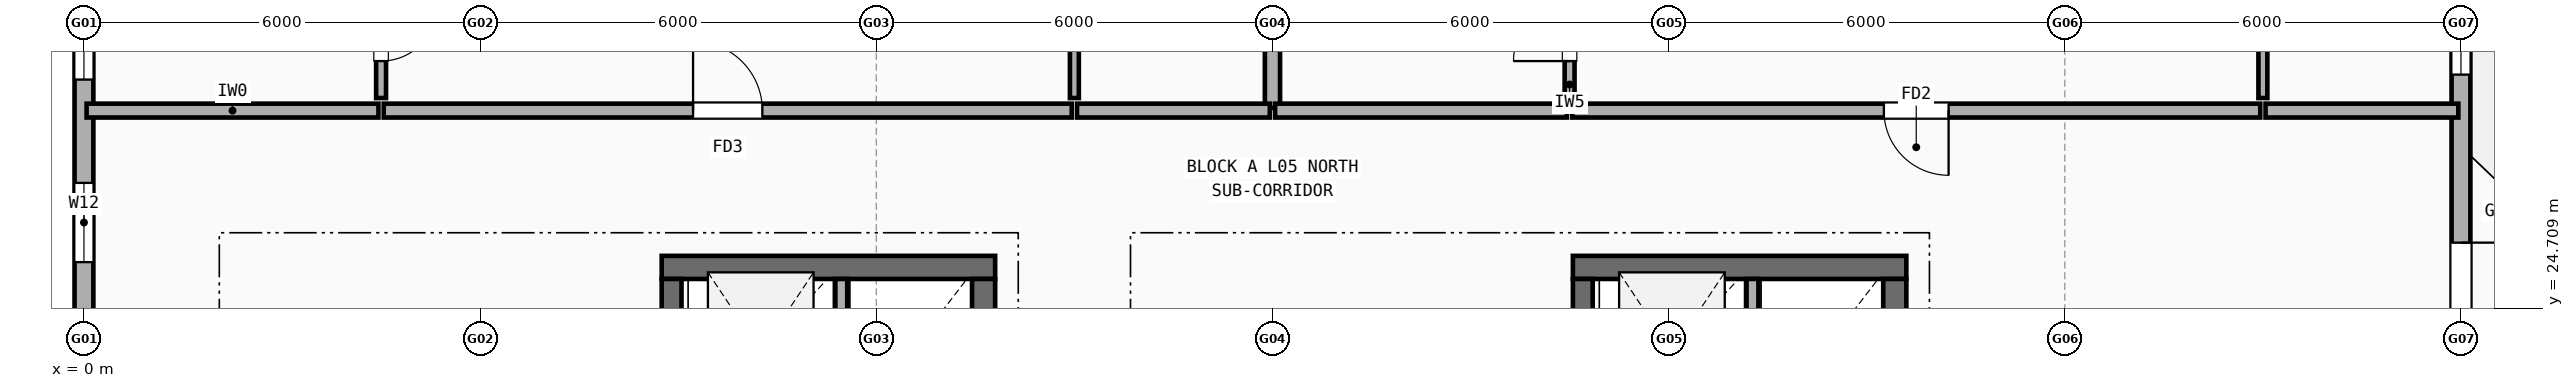
"""IFC4 building model, lengths in metres.
Left out: names, types, materials, properties, quantities, classifications, styles, units other than length and angle.
Written with IfcOpenShell. Run it as: python <this file> out.ifc"""

import sys

from ifc_helpers import new_model, si_unit, direction, frame, frame_2d, origin, place, context, subcontext, project, spatial, rectangle, extrude, element, fill, save


model = new_model("IFC4")
c1 = context("Model", 3, precision=1e-05, world=origin(), true_north=direction((0.0, 1.0)))
c2 = subcontext(c1, "Body", "Model", "MODEL_VIEW")
j1 = project(units=[si_unit("LENGTHUNIT", "METRE"), si_unit("PLANEANGLEUNIT", "RADIAN")], contexts=[c1])
p1 = place(None, origin())
s1 = spatial("IfcSite", under=j1, at=p1, CompositionType="ELEMENT")
p2 = place(p1, origin())
s2 = spatial("IfcBuilding", under=s1, at=p2, CompositionType="ELEMENT")
p3 = place(p2, frame((0.0, 0.0, 17.3)))
s3 = spatial("IfcBuildingStorey", under=s2, at=p3, CompositionType="ELEMENT", Elevation=17.3)
p4 = place(p3, frame((36.0, 24.35, 0.0), z_axis=(0.0, 0.0, 1.0), x_axis=(0.0, 1.0, 0.0)))
e1 = element("IfcWall", 1, at=p4, inside=s3, PredefinedType="STANDARD", context=c2, shape_type="SweptSolid", body=[
    extrude(rectangle(XDim=5.3, YDim=0.285, at=frame_2d((2.65, 0.0))), origin(), (0.0, 0.0, 1.0), 2.447),
])
p5 = place(p4, frame((0.2, 0.0, 0.0)))
e2 = element("IfcOpeningElement", 2, at=p5, cuts=e1, PredefinedType="OPENING", context=c2, shape_type="SweptSolid", body=[
    extrude(rectangle(XDim=1.15, YDim=2.15, at=frame_2d((0.575, 1.075))), frame((0.0, 0.152, 0.0), z_axis=(0.0, -1.0, 0.0), x_axis=(1.0, 0.0, 0.0)), (0.0, 0.0, 1.0), 0.305),
])
p6 = place(p4, frame((3.895, 0.0, 0.9)))
e3 = element("IfcOpeningElement", 3, at=p6, cuts=e1, PredefinedType="OPENING", context=c2, shape_type="SweptSolid", body=[
    extrude(rectangle(XDim=0.9, YDim=1.3, at=frame_2d((0.45, 0.65))), frame((0.0, 0.152, 0.0), z_axis=(0.0, -1.0, 0.0), x_axis=(1.0, 0.0, 0.0)), (0.0, 0.0, 1.0), 0.305),
])
p7 = place(p3, frame((0.0, 29.65, 0.0), z_axis=(0.0, 0.0, 1.0), x_axis=(0.0, -1.0, 0.0)))
e4 = element("IfcWall", 4, at=p7, inside=s3, PredefinedType="STANDARD", context=c2, shape_type="SweptSolid", body=[
    extrude(rectangle(XDim=5.3, YDim=0.285, at=frame_2d((2.65, 0.0))), origin(), (0.0, 0.0, 1.0), 2.447),
])
p8 = place(p7, frame((0.43, 0.0, 0.9)))
e5 = element("IfcOpeningElement", 5, at=p8, cuts=e4, PredefinedType="OPENING", context=c2, shape_type="SweptSolid", body=[
    extrude(rectangle(XDim=1.05, YDim=1.35, at=frame_2d((0.525, 0.675))), frame((0.0, 0.152, 0.0), z_axis=(0.0, -1.0, 0.0), x_axis=(1.0, 0.0, 0.0)), (0.0, 0.0, 1.0), 0.305),
])
p9 = place(p7, frame((3.045, 0.0, 0.9)))
e6 = element("IfcOpeningElement", 6, at=p9, cuts=e4, PredefinedType="OPENING", context=c2, shape_type="SweptSolid", body=[
    extrude(rectangle(XDim=1.2, YDim=1.35, at=frame_2d((0.6, 0.675))), frame((0.0, 0.152, 0.0), z_axis=(0.0, -1.0, 0.0), x_axis=(1.0, 0.0, 0.0)), (0.0, 0.0, 1.0), 0.305),
])
p10 = place(p3, frame((13.8, 25.325, 0.0), z_axis=(0.0, 0.0, 1.0), x_axis=(-1.0, 0.0, 0.0)))
e7 = element("IfcWall", 7, at=p10, inside=s3, PredefinedType="SHEAR", context=c2, shape_type="SweptSolid", body=[
    extrude(rectangle(XDim=5.05, YDim=0.35, at=frame_2d((2.525, 0.0))), origin(), (0.0, 0.0, 1.0), 2.965),
])
p11 = place(p3, frame((13.625, 18.75, 0.0), z_axis=(0.0, 0.0, 1.0), x_axis=(0.0, 1.0, 0.0)))
e8 = element("IfcWall", 8, at=p11, inside=s3, PredefinedType="SHEAR", context=c2, shape_type="SweptSolid", body=[
    extrude(rectangle(XDim=6.4, YDim=0.35, at=frame_2d((3.2, 0.0))), origin(), (0.0, 0.0, 1.0), 2.965),
])
p12 = place(p3, frame((8.9, 21.8, 0.0), z_axis=(0.0, 0.0, 1.0), x_axis=(0.0, 1.0, 0.0)))
e9 = element("IfcWall", 9, at=p12, inside=s3, PredefinedType="SHEAR", context=c2, shape_type="SweptSolid", body=[
    extrude(rectangle(XDim=3.35, YDim=0.3, at=frame_2d((1.675, 0.0))), origin(), (0.0, 0.0, 1.0), 2.965),
])
p13 = place(p3, frame((11.47, 22.94, 0.0), z_axis=(0.0, 0.0, 1.0), x_axis=(0.0, 1.0, 0.0)))
e10 = element("IfcWall", 10, at=p13, inside=s3, PredefinedType="SOLIDWALL", context=c2, shape_type="SweptSolid", body=[
    extrude(rectangle(XDim=2.21, YDim=0.18, at=frame_2d((1.105, 0.0))), origin(), (0.0, 0.0, 1.0), 2.965),
])
p14 = place(p3, frame((27.6, 25.325, 0.0), z_axis=(0.0, 0.0, 1.0), x_axis=(-1.0, 0.0, 0.0)))
e11 = element("IfcWall", 11, at=p14, inside=s3, PredefinedType="SHEAR", context=c2, shape_type="SweptSolid", body=[
    extrude(rectangle(XDim=5.05, YDim=0.35, at=frame_2d((2.525, 0.0))), origin(), (0.0, 0.0, 1.0), 2.965),
])
p15 = place(p3, frame((27.425, 18.75, 0.0), z_axis=(0.0, 0.0, 1.0), x_axis=(0.0, 1.0, 0.0)))
e12 = element("IfcWall", 12, at=p15, inside=s3, PredefinedType="SHEAR", context=c2, shape_type="SweptSolid", body=[
    extrude(rectangle(XDim=6.4, YDim=0.35, at=frame_2d((3.2, 0.0))), origin(), (0.0, 0.0, 1.0), 2.965),
])
p16 = place(p3, frame((22.7, 21.8, 0.0), z_axis=(0.0, 0.0, 1.0), x_axis=(0.0, 1.0, 0.0)))
e13 = element("IfcWall", 13, at=p16, inside=s3, PredefinedType="SHEAR", context=c2, shape_type="SweptSolid", body=[
    extrude(rectangle(XDim=3.35, YDim=0.3, at=frame_2d((1.675, 0.0))), origin(), (0.0, 0.0, 1.0), 2.965),
])
p17 = place(p3, frame((25.27, 22.94, 0.0), z_axis=(0.0, 0.0, 1.0), x_axis=(0.0, 1.0, 0.0)))
e14 = element("IfcWall", 14, at=p17, inside=s3, PredefinedType="SOLIDWALL", context=c2, shape_type="SweptSolid", body=[
    extrude(rectangle(XDim=2.21, YDim=0.18, at=frame_2d((1.105, 0.0))), origin(), (0.0, 0.0, 1.0), 2.965),
])
p18 = place(p3, frame((18.0, 27.74, 0.0), z_axis=(0.0, 0.0, 1.0), x_axis=(0.0, 1.0, 0.0)))
e15 = element("IfcWall", 15, at=p18, inside=s3, PredefinedType="SOLIDWALL", context=c2, shape_type="SweptSolid", body=[
    extrude(rectangle(XDim=13.87, YDim=0.23, at=frame_2d((6.935, 0.0))), origin(), (0.0, 0.0, 1.0), 2.458),
])
p19 = place(p3, frame((0.04, 27.7, 0.0), z_axis=(0.0, 0.0, 1.0), x_axis=(1.0, 0.0, 0.0)))
e16 = element("IfcWall", 16, at=p19, inside=s3, PredefinedType="SOLIDWALL", context=c2, shape_type="SweptSolid", body=[
    extrude(rectangle(XDim=4.42, YDim=0.21, at=frame_2d((2.21, 0.0))), origin(), (0.0, 0.0, 1.0), 2.447),
])
p20 = place(p3, frame((4.54, 27.7, 0.0), z_axis=(0.0, 0.0, 1.0), x_axis=(1.0, 0.0, 0.0)))
e17 = element("IfcWall", 17, at=p20, inside=s3, PredefinedType="SOLIDWALL", context=c2, shape_type="SweptSolid", body=[
    extrude(rectangle(XDim=10.42, YDim=0.21, at=frame_2d((5.21, 0.0))), origin(), (0.0, 0.0, 1.0), 2.508),
])
p21 = place(p20, frame((4.685, 0.0, 0.0)))
e18 = element("IfcOpeningElement", 18, at=p21, cuts=e17, PredefinedType="OPENING", context=c2, shape_type="SweptSolid", body=[
    extrude(rectangle(XDim=1.05, YDim=2.15, at=frame_2d((0.525, 1.075))), frame((0.0, 0.115, 0.0), z_axis=(0.0, -1.0, 0.0), x_axis=(1.0, 0.0, 0.0)), (0.0, 0.0, 1.0), 0.23),
])
p22 = place(p3, frame((4.5, 27.89, 0.0), z_axis=(0.0, 0.0, 1.0), x_axis=(0.0, 1.0, 0.0)))
e19 = element("IfcWall", 19, at=p22, inside=s3, PredefinedType="PARTITIONING", context=c2, shape_type="SweptSolid", body=[
    extrude(rectangle(XDim=1.97, YDim=0.15, at=frame_2d((0.985, 0.0))), origin(), (0.0, 0.0, 1.0), 2.965),
])
p23 = place(p22, frame((0.56, 0.0, 0.0)))
e20 = element("IfcOpeningElement", 20, at=p23, cuts=e19, PredefinedType="OPENING", context=c2, shape_type="SweptSolid", body=[
    extrude(rectangle(XDim=0.85, YDim=2.1, at=frame_2d((0.425, 1.05))), frame((0.0, 0.085, 0.0), z_axis=(0.0, -1.0, 0.0), x_axis=(1.0, 0.0, 0.0)), (0.0, 0.0, 1.0), 0.17),
])
p24 = place(p3, frame((15.04, 27.7, 0.0), z_axis=(0.0, 0.0, 1.0), x_axis=(1.0, 0.0, 0.0)))
e21 = element("IfcWall", 21, at=p24, inside=s3, PredefinedType="SOLIDWALL", context=c2, shape_type="SweptSolid", body=[
    extrude(rectangle(XDim=2.92, YDim=0.21, at=frame_2d((1.46, 0.0))), origin(), (0.0, 0.0, 1.0), 2.965),
])
p25 = place(p3, frame((15.0, 27.89, 0.0), z_axis=(0.0, 0.0, 1.0), x_axis=(0.0, 1.0, 0.0)))
e22 = element("IfcWall", 22, at=p25, inside=s3, PredefinedType="PARTITIONING", context=c2, shape_type="SweptSolid", body=[
    extrude(rectangle(XDim=13.92, YDim=0.135, at=frame_2d((6.96, 0.0))), origin(), (0.0, 0.0, 1.0), 2.447),
])
p26 = place(p25, frame((6.65, 0.0, 0.0)))
e23 = element("IfcOpeningElement", 23, at=p26, cuts=e22, PredefinedType="OPENING", context=c2, shape_type="SweptSolid", body=[
    extrude(rectangle(XDim=0.88, YDim=2.1, at=frame_2d((0.44, 1.05))), frame((0.0, 0.077, 0.0), z_axis=(0.0, -1.0, 0.0), x_axis=(1.0, 0.0, 0.0)), (0.0, 0.0, 1.0), 0.155),
])
p27 = place(p3, frame((18.04, 27.7, 0.0), z_axis=(0.0, 0.0, 1.0), x_axis=(1.0, 0.0, 0.0)))
e24 = element("IfcWall", 24, at=p27, inside=s3, PredefinedType="SOLIDWALL", context=c2, shape_type="SweptSolid", body=[
    extrude(rectangle(XDim=4.42, YDim=0.21, at=frame_2d((2.21, 0.0))), origin(), (0.0, 0.0, 1.0), 2.965),
])
p28 = place(p3, frame((22.54, 27.7, 0.0), z_axis=(0.0, 0.0, 1.0), x_axis=(1.0, 0.0, 0.0)))
e25 = element("IfcWall", 25, at=p28, inside=s3, PredefinedType="SOLIDWALL", context=c2, shape_type="SweptSolid", body=[
    extrude(rectangle(XDim=10.42, YDim=0.21, at=frame_2d((5.21, 0.0))), origin(), (0.0, 0.0, 1.0), 2.447),
])
p29 = place(p28, frame((4.72, 0.0, 0.0)))
e26 = element("IfcOpeningElement", 26, at=p29, cuts=e25, PredefinedType="OPENING", context=c2, shape_type="SweptSolid", body=[
    extrude(rectangle(XDim=0.98, YDim=2.15, at=frame_2d((0.49, 1.075))), frame((0.0, 0.115, 0.0), z_axis=(0.0, -1.0, 0.0), x_axis=(1.0, 0.0, 0.0)), (0.0, 0.0, 1.0), 0.23),
])
p30 = place(p3, frame((22.5, 27.89, 0.0), z_axis=(0.0, 0.0, 1.0), x_axis=(0.0, 1.0, 0.0)))
e27 = element("IfcWall", 27, at=p30, inside=s3, PredefinedType="PARTITIONING", context=c2, shape_type="SweptSolid", body=[
    extrude(rectangle(XDim=1.97, YDim=0.15, at=frame_2d((0.985, 0.0))), origin(), (0.0, 0.0, 1.0), 2.965),
])
p31 = place(p30, frame((0.56, 0.0, 0.0)))
e28 = element("IfcOpeningElement", 28, at=p31, cuts=e27, PredefinedType="OPENING", context=c2, shape_type="SweptSolid", body=[
    extrude(rectangle(XDim=0.85, YDim=2.1, at=frame_2d((0.425, 1.05))), frame((0.0, 0.085, 0.0), z_axis=(0.0, -1.0, 0.0), x_axis=(1.0, 0.0, 0.0)), (0.0, 0.0, 1.0), 0.17),
])
p32 = place(p3, frame((33.04, 27.7, 0.0), z_axis=(0.0, 0.0, 1.0), x_axis=(1.0, 0.0, 0.0)))
e29 = element("IfcWall", 29, at=p32, inside=s3, PredefinedType="SOLIDWALL", context=c2, shape_type="SweptSolid", body=[
    extrude(rectangle(XDim=2.92, YDim=0.21, at=frame_2d((1.46, 0.0))), origin(), (0.0, 0.0, 1.0), 2.447),
])
p33 = place(p3, frame((33.0, 27.89, 0.0), z_axis=(0.0, 0.0, 1.0), x_axis=(0.0, 1.0, 0.0)))
e30 = element("IfcWall", 30, at=p33, inside=s3, PredefinedType="PARTITIONING", context=c2, shape_type="SweptSolid", body=[
    extrude(rectangle(XDim=13.92, YDim=0.135, at=frame_2d((6.96, 0.0))), origin(), (0.0, 0.0, 1.0), 2.447),
])
p34 = place(p33, frame((6.65, 0.0, 0.0)))
e31 = element("IfcOpeningElement", 31, at=p34, cuts=e30, PredefinedType="OPENING", context=c2, shape_type="SweptSolid", body=[
    extrude(rectangle(XDim=0.9, YDim=2.1, at=frame_2d((0.45, 1.05))), frame((0.0, 0.077, 0.0), z_axis=(0.0, -1.0, 0.0), x_axis=(1.0, 0.0, 0.0)), (0.0, 0.0, 1.0), 0.155),
])
p35 = place(p5, frame((1.15, 0.0, 0.0), z_axis=(0.0, 0.0, 1.0), x_axis=(-1.0, 0.0, 0.0)))
e32 = element("IfcDoor", 32, at=p35, inside=s3, OperationType="SINGLE_SWING_RIGHT", PredefinedType="DOOR", context=c2, shape_type="SweptSolid", body=[
    extrude(rectangle(XDim=1.15, YDim=2.15, at=frame_2d((0.575, 1.075))), frame((0.0, 0.025, 0.0), z_axis=(0.0, -1.0, 0.0), x_axis=(1.0, 0.0, 0.0)), (0.0, 0.0, 1.0), 0.05),
])
fill(e2, e32)
p36 = place(p6, origin())
e33 = element("IfcWindow", 33, at=p36, inside=s3, PartitioningType="SINGLE_PANEL", PredefinedType="WINDOW", context=c2, shape_type="SweptSolid", body=[
    extrude(rectangle(XDim=0.9, YDim=1.3, at=frame_2d((0.45, 0.65))), frame((0.0, 0.03, 0.0), z_axis=(0.0, -1.0, 0.0), x_axis=(1.0, 0.0, 0.0)), (0.0, 0.0, 1.0), 0.06),
])
fill(e3, e33)
p37 = place(p8, origin())
e34 = element("IfcWindow", 34, at=p37, inside=s3, PartitioningType="SINGLE_PANEL", PredefinedType="WINDOW", context=c2, shape_type="SweptSolid", body=[
    extrude(rectangle(XDim=1.05, YDim=1.35, at=frame_2d((0.525, 0.675))), frame((0.0, 0.03, 0.0), z_axis=(0.0, -1.0, 0.0), x_axis=(1.0, 0.0, 0.0)), (0.0, 0.0, 1.0), 0.06),
])
fill(e5, e34)
p38 = place(p9, origin())
e35 = element("IfcWindow", 35, at=p38, inside=s3, PartitioningType="SINGLE_PANEL", PredefinedType="WINDOW", context=c2, shape_type="SweptSolid", body=[
    extrude(rectangle(XDim=1.2, YDim=1.35, at=frame_2d((0.6, 0.675))), frame((0.0, 0.03, 0.0), z_axis=(0.0, -1.0, 0.0), x_axis=(1.0, 0.0, 0.0)), (0.0, 0.0, 1.0), 0.06),
])
fill(e6, e35)
p39 = place(p21, origin())
e36 = element("IfcDoor", 36, at=p39, inside=s3, OperationType="SINGLE_SWING_LEFT", PredefinedType="DOOR", context=c2, shape_type="SweptSolid", body=[
    extrude(rectangle(XDim=1.05, YDim=2.15, at=frame_2d((0.525, 1.075))), frame((0.0, 0.025, 0.0), z_axis=(0.0, -1.0, 0.0), x_axis=(1.0, 0.0, 0.0)), (0.0, 0.0, 1.0), 0.05),
])
fill(e18, e36)
p40 = place(p23, origin())
e37 = element("IfcDoor", 37, at=p40, inside=s3, OperationType="SINGLE_SWING_RIGHT", PredefinedType="DOOR", context=c2, shape_type="SweptSolid", body=[
    extrude(rectangle(XDim=0.85, YDim=2.1, at=frame_2d((0.425, 1.05))), frame((0.0, 0.025, 0.0), z_axis=(0.0, -1.0, 0.0), x_axis=(1.0, 0.0, 0.0)), (0.0, 0.0, 1.0), 0.05),
])
fill(e20, e37)
p41 = place(p29, origin())
e38 = element("IfcDoor", 38, at=p41, inside=s3, OperationType="SINGLE_SWING_RIGHT", PredefinedType="DOOR", context=c2, shape_type="SweptSolid", body=[
    extrude(rectangle(XDim=0.98, YDim=2.15, at=frame_2d((0.49, 1.075))), frame((0.0, 0.025, 0.0), z_axis=(0.0, -1.0, 0.0), x_axis=(1.0, 0.0, 0.0)), (0.0, 0.0, 1.0), 0.05),
])
fill(e26, e38)
p42 = place(p31, origin())
e39 = element("IfcDoor", 39, at=p42, inside=s3, OperationType="SINGLE_SWING_LEFT", PredefinedType="DOOR", context=c2, shape_type="SweptSolid", body=[
    extrude(rectangle(XDim=0.85, YDim=2.1, at=frame_2d((0.425, 1.05))), frame((0.0, 0.025, 0.0), z_axis=(0.0, -1.0, 0.0), x_axis=(1.0, 0.0, 0.0)), (0.0, 0.0, 1.0), 0.05),
])
fill(e28, e39)
save(model, sys.argv[1])
